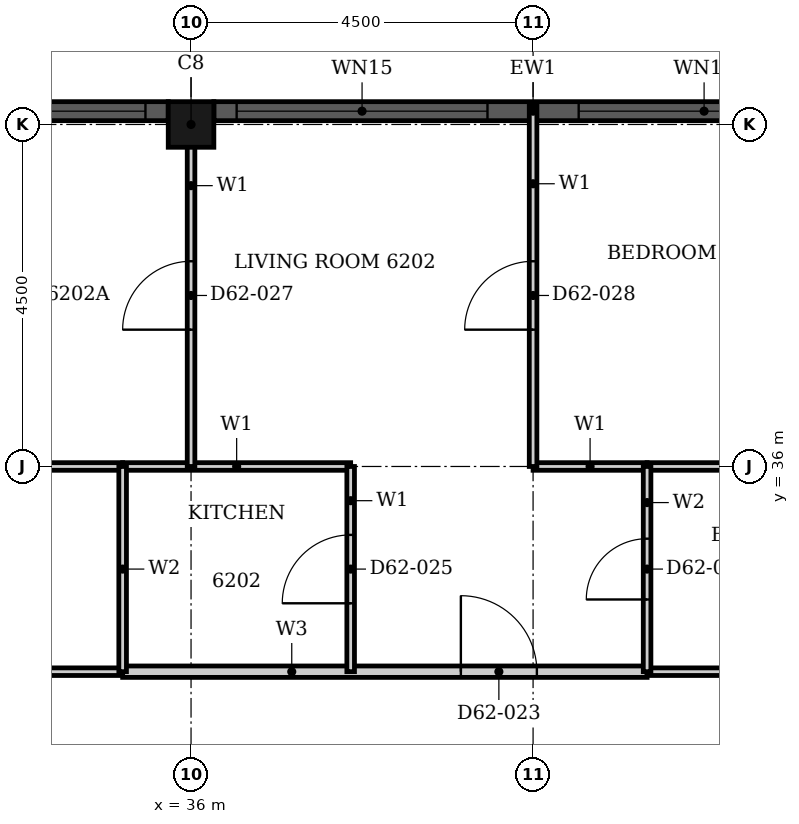
"""IFC4 building model, lengths in metres.
Left out: names, types, materials, properties, quantities, classifications, styles, units other than length and angle.
Written with IfcOpenShell. Run it as: python <this file> out.ifc"""

import sys

from ifc_helpers import new_model, si_unit, direction, frame, frame_2d, origin, origin_2d, place, context, subcontext, project, spatial, rectangle, hollow_rectangle, extrude, element, fill, save


model = new_model("IFC4")
c1 = context("Model", 3, precision=1e-05, world=origin(), true_north=direction((0.0, 1.0)))
c2 = subcontext(c1, "Body", "Model", "MODEL_VIEW")
j1 = project(units=[si_unit("LENGTHUNIT", "METRE"), si_unit("PLANEANGLEUNIT", "RADIAN")], contexts=[c1])
p1 = place(None, origin())
s1 = spatial("IfcSite", under=j1, at=p1, CompositionType="ELEMENT")
p2 = place(p1, origin())
s2 = spatial("IfcBuilding", under=s1, at=p2, CompositionType="ELEMENT")
p3 = place(p2, frame((0.0, 0.0, 245.3)))
s3 = spatial("IfcBuildingStorey", under=s2, at=p3, CompositionType="ELEMENT", Elevation=245.3)
p4 = place(p3, frame((36.0, 40.5, 0.0), z_axis=(0.0, 0.0, 1.0), x_axis=(1.0, 0.0, 0.0)))
e1 = element("IfcColumn", 1, at=p4, inside=s3, PredefinedType="COLUMN", context=c2, shape_type="SweptSolid", body=[
    extrude(hollow_rectangle(XDim=0.6, YDim=0.6, WallThickness=0.02, at=origin_2d()), origin(), (0.0, 0.0, 1.0), 3.7),
])
p5 = place(p3, frame((44.7, 40.675, 0.0), z_axis=(0.0, 0.0, 1.0), x_axis=(-1.0, 0.0, 0.0)))
e2 = element("IfcWall", 2, at=p5, inside=s3, PredefinedType="SOLIDWALL", context=c2, shape_type="SweptSolid", body=[
    extrude(rectangle(XDim=8.4, YDim=0.25, at=frame_2d((4.2, 0.0))), origin(), (0.0, 0.0, 1.0), 3.7),
])
p6 = place(p5, frame((0.3, 0.0, 0.45)))
e3 = element("IfcOpeningElement", 3, at=p6, cuts=e2, PredefinedType="OPENING", context=c2, shape_type="SweptSolid", body=[
    extrude(rectangle(XDim=3.3, YDim=2.3, at=frame_2d((1.65, 1.15))), frame((0.0, 0.135, 0.0), z_axis=(0.0, -1.0, 0.0), x_axis=(1.0, 0.0, 0.0)), (0.0, 0.0, 1.0), 0.27),
])
p7 = place(p5, frame((4.8, 0.0, 0.45)))
e4 = element("IfcOpeningElement", 4, at=p7, cuts=e2, PredefinedType="OPENING", context=c2, shape_type="SweptSolid", body=[
    extrude(rectangle(XDim=3.3, YDim=2.3, at=frame_2d((1.65, 1.15))), frame((0.0, 0.135, 0.0), z_axis=(0.0, -1.0, 0.0), x_axis=(1.0, 0.0, 0.0)), (0.0, 0.0, 1.0), 0.27),
])
p8 = place(p3, frame((35.7, 40.675, 0.0), z_axis=(0.0, 0.0, 1.0), x_axis=(-1.0, 0.0, 0.0)))
e5 = element("IfcWall", 5, at=p8, inside=s3, PredefinedType="SOLIDWALL", context=c2, shape_type="SweptSolid", body=[
    extrude(rectangle(XDim=8.4, YDim=0.25, at=frame_2d((4.2, 0.0))), origin(), (0.0, 0.0, 1.0), 3.7),
])
p9 = place(p8, frame((0.3, 0.0, 0.45)))
e6 = element("IfcOpeningElement", 6, at=p9, cuts=e5, PredefinedType="OPENING", context=c2, shape_type="SweptSolid", body=[
    extrude(rectangle(XDim=3.3, YDim=2.3, at=frame_2d((1.65, 1.15))), frame((0.0, 0.135, 0.0), z_axis=(0.0, -1.0, 0.0), x_axis=(1.0, 0.0, 0.0)), (0.0, 0.0, 1.0), 0.27),
])
p10 = place(p8, frame((4.8, 0.0, 0.45)))
e7 = element("IfcOpeningElement", 7, at=p10, cuts=e5, PredefinedType="OPENING", context=c2, shape_type="SweptSolid", body=[
    extrude(rectangle(XDim=3.3, YDim=2.3, at=frame_2d((1.65, 1.15))), frame((0.0, 0.135, 0.0), z_axis=(0.0, -1.0, 0.0), x_axis=(1.0, 0.0, 0.0)), (0.0, 0.0, 1.0), 0.27),
])
p11 = place(p3, frame((35.1, 33.3, 0.0), z_axis=(0.0, 0.0, 1.0), x_axis=(1.0, 0.0, 0.0)))
e8 = element("IfcWall", 8, at=p11, inside=s3, PredefinedType="PARTITIONING", context=c2, shape_type="SweptSolid", body=[
    extrude(rectangle(XDim=6.9, YDim=0.15, at=frame_2d((3.45, 0.0))), origin(), (0.0, 0.0, 1.0), 3.4),
])
p12 = place(p11, frame((4.45, 0.0, 0.0)))
e9 = element("IfcOpeningElement", 9, at=p12, cuts=e8, PredefinedType="OPENING", context=c2, shape_type="SweptSolid", body=[
    extrude(rectangle(XDim=1.0, YDim=2.2, at=frame_2d((0.5, 1.1))), frame((0.0, 0.085, 0.0), z_axis=(0.0, -1.0, 0.0), x_axis=(1.0, 0.0, 0.0)), (0.0, 0.0, 1.0), 0.17),
])
p13 = place(p3, frame((40.5, 36.0, 0.0), z_axis=(0.0, 0.0, 1.0), x_axis=(1.0, 0.0, 0.0)))
e10 = element("IfcWall", 10, at=p13, inside=s3, PredefinedType="PARTITIONING", context=c2, shape_type="SweptSolid", body=[
    extrude(rectangle(XDim=1.5, YDim=0.1, at=frame_2d((0.75, 0.0))), origin(), (0.0, 0.0, 1.0), 3.4),
])
p14 = place(p3, frame((35.1, 36.0, 0.0), z_axis=(0.0, 0.0, 1.0), x_axis=(1.0, 0.0, 0.0)))
e11 = element("IfcWall", 11, at=p14, inside=s3, PredefinedType="PARTITIONING", context=c2, shape_type="SweptSolid", body=[
    extrude(rectangle(XDim=3.0, YDim=0.1, at=frame_2d((1.5, 0.0))), origin(), (0.0, 0.0, 1.0), 3.4),
])
p15 = place(p3, frame((36.0, 36.0, 0.0), z_axis=(0.0, 0.0, 1.0), x_axis=(0.0, 1.0, 0.0)))
e12 = element("IfcWall", 12, at=p15, inside=s3, PredefinedType="PARTITIONING", context=c2, shape_type="SweptSolid", body=[
    extrude(rectangle(XDim=4.69, YDim=0.1, at=frame_2d((2.345, 0.0))), origin(), (0.0, 0.0, 1.0), 3.4),
])
p16 = place(p15, frame((1.8, 0.0, 0.0)))
e13 = element("IfcOpeningElement", 13, at=p16, cuts=e12, PredefinedType="OPENING", context=c2, shape_type="SweptSolid", body=[
    extrude(rectangle(XDim=0.9, YDim=2.1, at=frame_2d((0.45, 1.05))), frame((0.0, 0.06, 0.0), z_axis=(0.0, -1.0, 0.0), x_axis=(1.0, 0.0, 0.0)), (0.0, 0.0, 1.0), 0.12),
])
p17 = place(p3, frame((38.1, 33.3, 0.0), z_axis=(0.0, 0.0, 1.0), x_axis=(0.0, 1.0, 0.0)))
e14 = element("IfcWall", 14, at=p17, inside=s3, PredefinedType="PARTITIONING", context=c2, shape_type="SweptSolid", body=[
    extrude(rectangle(XDim=2.7, YDim=0.1, at=frame_2d((1.35, 0.0))), origin(), (0.0, 0.0, 1.0), 3.4),
])
p18 = place(p17, frame((0.9, 0.0, 0.0)))
e15 = element("IfcOpeningElement", 15, at=p18, cuts=e14, PredefinedType="OPENING", context=c2, shape_type="SweptSolid", body=[
    extrude(rectangle(XDim=0.9, YDim=2.1, at=frame_2d((0.45, 1.05))), frame((0.0, 0.06, 0.0), z_axis=(0.0, -1.0, 0.0), x_axis=(1.0, 0.0, 0.0)), (0.0, 0.0, 1.0), 0.12),
])
p19 = place(p3, frame((40.5, 36.0, 0.0), z_axis=(0.0, 0.0, 1.0), x_axis=(0.0, 1.0, 0.0)))
e16 = element("IfcWall", 16, at=p19, inside=s3, PredefinedType="PARTITIONING", context=c2, shape_type="SweptSolid", body=[
    extrude(rectangle(XDim=4.74, YDim=0.1, at=frame_2d((2.37, 0.0))), origin(), (0.0, 0.0, 1.0), 3.4),
])
p20 = place(p19, frame((1.8, 0.0, 0.0)))
e17 = element("IfcOpeningElement", 17, at=p20, cuts=e16, PredefinedType="OPENING", context=c2, shape_type="SweptSolid", body=[
    extrude(rectangle(XDim=0.9, YDim=2.1, at=frame_2d((0.45, 1.05))), frame((0.0, 0.06, 0.0), z_axis=(0.0, -1.0, 0.0), x_axis=(1.0, 0.0, 0.0)), (0.0, 0.0, 1.0), 0.12),
])
p21 = place(p3, frame((28.5, 33.3, 0.0), z_axis=(0.0, 0.0, 1.0), x_axis=(1.0, 0.0, 0.0)))
e18 = element("IfcWall", 18, at=p21, inside=s3, PredefinedType="PARTITIONING", context=c2, shape_type="SweptSolid", body=[
    extrude(rectangle(XDim=6.6, YDim=0.1, at=frame_2d((3.3, 0.0))), origin(), (0.0, 0.0, 1.0), 3.4),
])
p22 = place(p3, frame((42.0, 33.3, 0.0), z_axis=(0.0, 0.0, 1.0), x_axis=(1.0, 0.0, 0.0)))
e19 = element("IfcWall", 19, at=p22, inside=s3, PredefinedType="PARTITIONING", context=c2, shape_type="SweptSolid", body=[
    extrude(rectangle(XDim=3.0, YDim=0.1, at=frame_2d((1.5, 0.0))), origin(), (0.0, 0.0, 1.0), 3.4),
])
p23 = place(p3, frame((28.5, 36.0, 0.0), z_axis=(0.0, 0.0, 1.0), x_axis=(1.0, 0.0, 0.0)))
e20 = element("IfcWall", 20, at=p23, inside=s3, PredefinedType="PARTITIONING", context=c2, shape_type="SweptSolid", body=[
    extrude(rectangle(XDim=6.6, YDim=0.1, at=frame_2d((3.3, 0.0))), origin(), (0.0, 0.0, 1.0), 3.4),
])
p24 = place(p23, frame((4.4, 0.0, 0.0)))
e21 = element("IfcOpeningElement", 21, at=p24, cuts=e20, PredefinedType="OPENING", context=c2, shape_type="SweptSolid", body=[
    extrude(rectangle(XDim=0.8, YDim=2.1, at=frame_2d((0.4, 1.05))), frame((0.0, 0.06, 0.0), z_axis=(0.0, -1.0, 0.0), x_axis=(1.0, 0.0, 0.0)), (0.0, 0.0, 1.0), 0.12),
])
p25 = place(p3, frame((42.0, 36.0, 0.0), z_axis=(0.0, 0.0, 1.0), x_axis=(1.0, 0.0, 0.0)))
e22 = element("IfcWall", 22, at=p25, inside=s3, PredefinedType="PARTITIONING", context=c2, shape_type="SweptSolid", body=[
    extrude(rectangle(XDim=3.0, YDim=0.1, at=frame_2d((1.5, 0.0))), origin(), (0.0, 0.0, 1.0), 3.4),
])
p26 = place(p3, frame((35.1, 33.3, 0.0), z_axis=(0.0, 0.0, 1.0), x_axis=(0.0, 1.0, 0.0)))
e23 = element("IfcWall", 23, at=p26, inside=s3, PredefinedType="PARTITIONING", context=c2, shape_type="SweptSolid", body=[
    extrude(rectangle(XDim=2.7, YDim=0.1, at=frame_2d((1.35, 0.0))), origin(), (0.0, 0.0, 1.0), 3.4),
])
p27 = place(p3, frame((42.0, 33.3, 0.0), z_axis=(0.0, 0.0, 1.0), x_axis=(0.0, 1.0, 0.0)))
e24 = element("IfcWall", 24, at=p27, inside=s3, PredefinedType="PARTITIONING", context=c2, shape_type="SweptSolid", body=[
    extrude(rectangle(XDim=2.7, YDim=0.1, at=frame_2d((1.35, 0.0))), origin(), (0.0, 0.0, 1.0), 3.4),
])
p28 = place(p27, frame((0.95, 0.0, 0.0)))
e25 = element("IfcOpeningElement", 25, at=p28, cuts=e24, PredefinedType="OPENING", context=c2, shape_type="SweptSolid", body=[
    extrude(rectangle(XDim=0.8, YDim=2.1, at=frame_2d((0.4, 1.05))), frame((0.0, 0.06, 0.0), z_axis=(0.0, -1.0, 0.0), x_axis=(1.0, 0.0, 0.0)), (0.0, 0.0, 1.0), 0.12),
])
p29 = place(p6, origin())
e26 = element("IfcWindow", 26, at=p29, inside=s3, PartitioningType="SINGLE_PANEL", PredefinedType="WINDOW", context=c2, shape_type="SweptSolid", body=[
    extrude(rectangle(XDim=3.3, YDim=2.3, at=frame_2d((1.65, 1.15))), frame((0.0, 0.03, 0.0), z_axis=(0.0, -1.0, 0.0), x_axis=(1.0, 0.0, 0.0)), (0.0, 0.0, 1.0), 0.06),
])
fill(e3, e26)
p30 = place(p7, origin())
e27 = element("IfcWindow", 27, at=p30, inside=s3, PartitioningType="SINGLE_PANEL", PredefinedType="WINDOW", context=c2, shape_type="SweptSolid", body=[
    extrude(rectangle(XDim=3.3, YDim=2.3, at=frame_2d((1.65, 1.15))), frame((0.0, 0.03, 0.0), z_axis=(0.0, -1.0, 0.0), x_axis=(1.0, 0.0, 0.0)), (0.0, 0.0, 1.0), 0.06),
])
fill(e4, e27)
p31 = place(p9, origin())
e28 = element("IfcWindow", 28, at=p31, inside=s3, PartitioningType="SINGLE_PANEL", PredefinedType="WINDOW", context=c2, shape_type="SweptSolid", body=[
    extrude(rectangle(XDim=3.3, YDim=2.3, at=frame_2d((1.65, 1.15))), frame((0.0, 0.03, 0.0), z_axis=(0.0, -1.0, 0.0), x_axis=(1.0, 0.0, 0.0)), (0.0, 0.0, 1.0), 0.06),
])
fill(e6, e28)
p32 = place(p12, origin())
e29 = element("IfcDoor", 29, at=p32, inside=s3, OperationType="SINGLE_SWING_RIGHT", PredefinedType="DOOR", context=c2, shape_type="SweptSolid", body=[
    extrude(rectangle(XDim=1.0, YDim=2.2, at=frame_2d((0.5, 1.1))), frame((0.0, 0.025, 0.0), z_axis=(0.0, -1.0, 0.0), x_axis=(1.0, 0.0, 0.0)), (0.0, 0.0, 1.0), 0.05),
])
fill(e9, e29)
p33 = place(p18, origin())
e30 = element("IfcDoor", 30, at=p33, inside=s3, OperationType="SINGLE_SWING_LEFT", PredefinedType="DOOR", context=c2, shape_type="SweptSolid", body=[
    extrude(rectangle(XDim=0.9, YDim=2.1, at=frame_2d((0.45, 1.05))), frame((0.0, 0.025, 0.0), z_axis=(0.0, -1.0, 0.0), x_axis=(1.0, 0.0, 0.0)), (0.0, 0.0, 1.0), 0.05),
])
fill(e15, e30)
p34 = place(p28, origin())
e31 = element("IfcDoor", 31, at=p34, inside=s3, OperationType="SINGLE_SWING_RIGHT", PredefinedType="DOOR", context=c2, shape_type="SweptSolid", body=[
    extrude(rectangle(XDim=0.8, YDim=2.1, at=frame_2d((0.4, 1.05))), frame((0.0, 0.025, 0.0), z_axis=(0.0, -1.0, 0.0), x_axis=(1.0, 0.0, 0.0)), (0.0, 0.0, 1.0), 0.05),
])
fill(e25, e31)
p35 = place(p16, origin())
e32 = element("IfcDoor", 32, at=p35, inside=s3, OperationType="SINGLE_SWING_LEFT", PredefinedType="DOOR", context=c2, shape_type="SweptSolid", body=[
    extrude(rectangle(XDim=0.9, YDim=2.1, at=frame_2d((0.45, 1.05))), frame((0.0, 0.025, 0.0), z_axis=(0.0, -1.0, 0.0), x_axis=(1.0, 0.0, 0.0)), (0.0, 0.0, 1.0), 0.05),
])
fill(e13, e32)
p36 = place(p20, origin())
e33 = element("IfcDoor", 33, at=p36, inside=s3, OperationType="SINGLE_SWING_LEFT", PredefinedType="DOOR", context=c2, shape_type="SweptSolid", body=[
    extrude(rectangle(XDim=0.9, YDim=2.1, at=frame_2d((0.45, 1.05))), frame((0.0, 0.025, 0.0), z_axis=(0.0, -1.0, 0.0), x_axis=(1.0, 0.0, 0.0)), (0.0, 0.0, 1.0), 0.05),
])
fill(e17, e33)
save(model, sys.argv[1])
